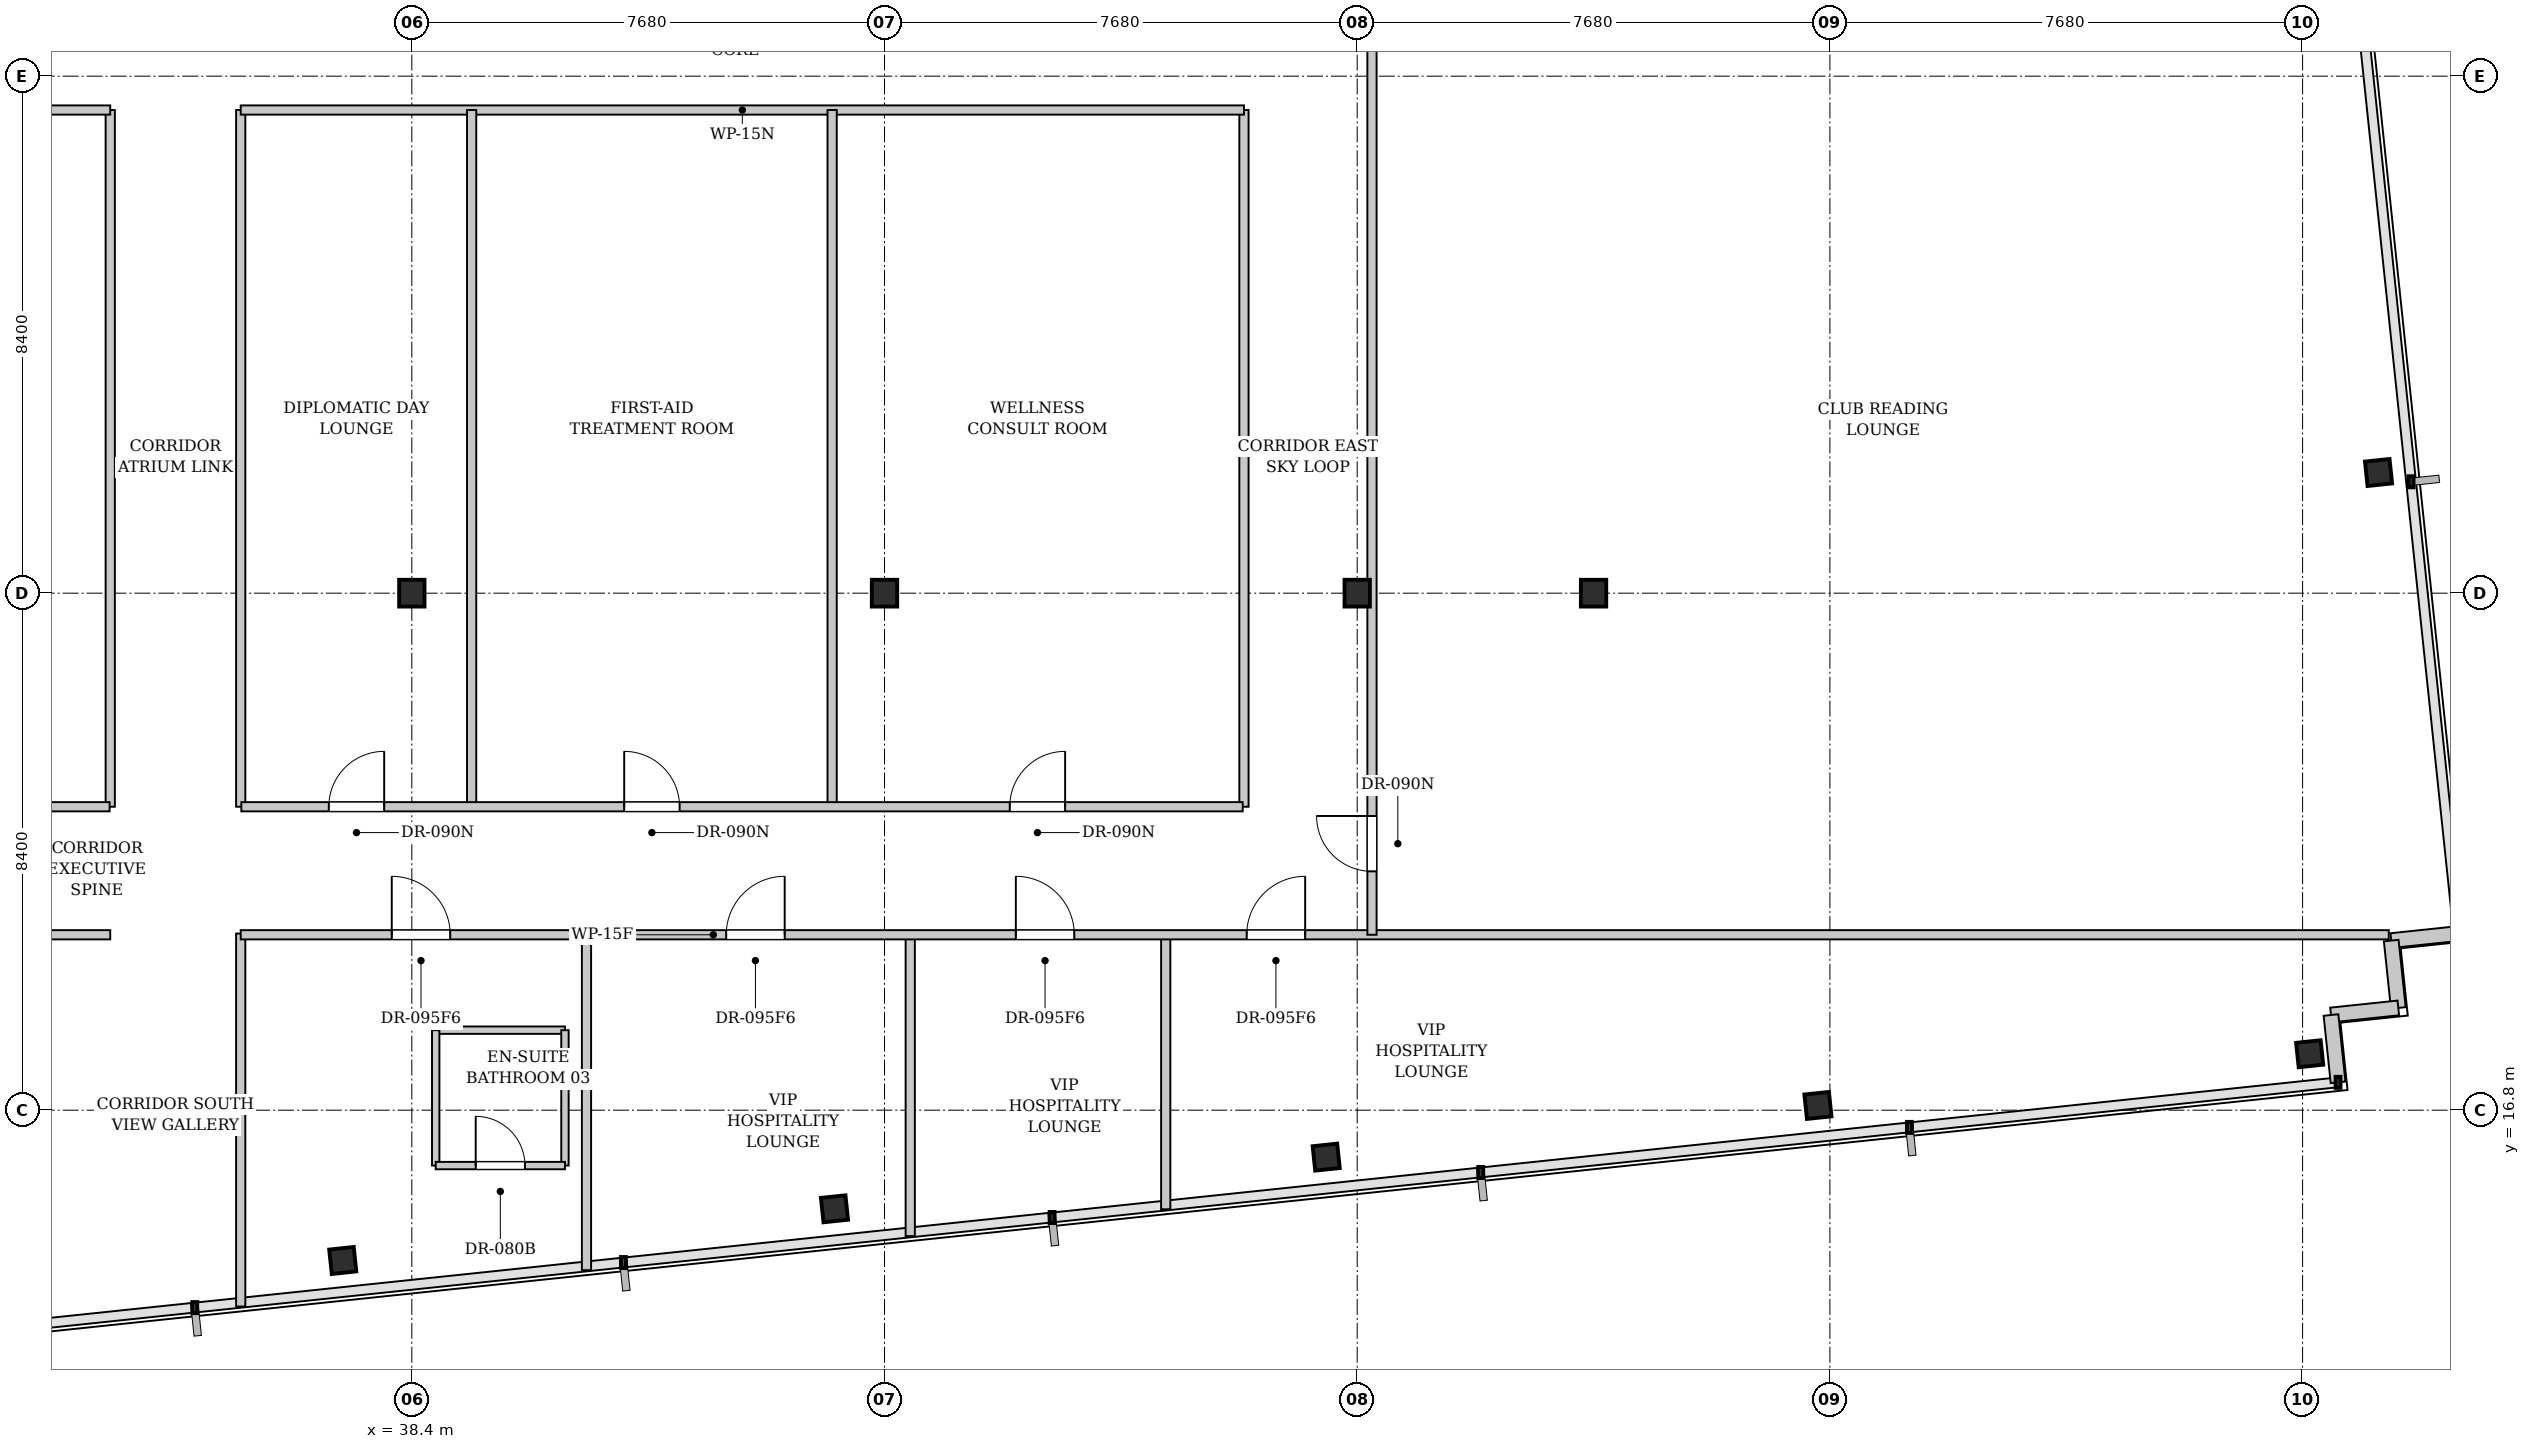
"""IFC4 building model, lengths in metres.
Left out: names, types, materials, properties, quantities, classifications, styles, units other than length and angle.
Written with IfcOpenShell. Run it as: python <this file> out.ifc"""

import sys

from ifc_helpers import new_model, si_unit, direction, frame, frame_2d, origin, origin_2d, place, context, subcontext, project, spatial, rectangle, i_section, extrude, element, fill, save


model = new_model("IFC4")
c1 = context("Model", 3, precision=1e-05, world=origin(), true_north=direction((0.0, 1.0)))
c2 = subcontext(c1, "Body", "Model", "MODEL_VIEW")
j1 = project(units=[si_unit("LENGTHUNIT", "METRE"), si_unit("PLANEANGLEUNIT", "RADIAN")], contexts=[c1])
p1 = place(None, origin())
s1 = spatial("IfcSite", under=j1, at=p1, CompositionType="ELEMENT")
p2 = place(p1, origin())
s2 = spatial("IfcBuilding", under=s1, at=p2, CompositionType="ELEMENT")
p3 = place(p2, frame((0.0, 0.0, 211.1)))
s3 = spatial("IfcBuildingStorey", under=s2, at=p3, CompositionType="ELEMENT", Elevation=211.1)
for number, where, z_axis, x_axis in (
    (1, (38.4, 25.2, 0.0), (0.0, 0.0, 1.0), (1.0, 0.0, 0.0)),
    (2, (46.08, 25.2, 0.0), (0.0, 0.0, 1.0), (1.0, 0.0, 0.0)),
    (3, (53.76, 25.2, 0.0), (0.0, 0.0, 1.0), (1.0, 0.0, 0.0)),
    (4, (57.6, 25.2, 0.0), (0.0, 0.0, 1.0), (1.0, 0.0, 0.0)),
):
    element("IfcColumn", number, at=place(p3, frame(where, z_axis=z_axis, x_axis=x_axis)), inside=s3, PredefinedType="COLUMN", context=c2, shape_type="SweptSolid", body=[
        extrude(i_section(OverallWidth=0.412, OverallDepth=0.435, WebThickness=0.036, FlangeThickness=0.058, FilletRadius=0.015, at=origin_2d()), origin(), (0.0, 0.0, 1.0), 3.3),
    ])
for number, where, z_axis, x_axis in (
    (5, (37.278, 14.358, 0.0), (0.0, 0.0, 1.0), (0.995, 0.105, 0.0)),
    (6, (45.267, 15.198, 0.0), (0.0, 0.0, 1.0), (0.995, 0.105, 0.0)),
    (7, (53.256, 16.037, 0.0), (0.0, 0.0, 1.0), (0.995, 0.105, 0.0)),
    (8, (61.246, 16.877, 0.0), (0.0, 0.0, 1.0), (0.995, 0.105, 0.0)),
    (9, (69.235, 17.717, 0.0), (0.0, 0.0, 1.0), (0.995, 0.105, 0.0)),
    (10, (70.354, 27.16, 0.0), (0.0, 0.0, 1.0), (0.995, 0.105, 0.0)),
):
    element("IfcColumn", number, at=place(p3, frame(where, z_axis=z_axis, x_axis=x_axis)), inside=s3, PredefinedType="COLUMN", context=c2, shape_type="SweptSolid", body=[
        extrude(i_section(OverallWidth=0.401, OverallDepth=0.399, WebThickness=0.025, FlangeThickness=0.04, FilletRadius=0.015, at=origin_2d()), origin(), (0.0, 0.0, 1.0), 3.3),
    ])
for number, where, z_axis, x_axis in (
    (11, (71.654, 19.67, 0.0), (0.0, 0.0, 1.0), (-0.995, -0.105, 0.0)),
    (12, (70.56, 19.555, 0.0), (0.0, 0.0, 1.0), (0.105, -0.995, 0.0)),
    (13, (70.675, 18.461, 0.0), (0.0, 0.0, 1.0), (-0.995, -0.105, 0.0)),
    (14, (69.581, 18.346, 0.0), (0.0, 0.0, 1.0), (0.105, -0.995, 0.0)),
):
    element("IfcWall", number, at=place(p3, frame(where, z_axis=z_axis, x_axis=x_axis)), inside=s3, PredefinedType="SOLIDWALL", context=c2, shape_type="SweptSolid", body=[
        extrude(rectangle(XDim=1.1, YDim=0.24, at=frame_2d((0.55, 0.0))), origin(), (0.0, 0.0, 1.0), 3.08),
    ])
p4 = place(p3, frame((38.788, 18.1, 0.0), z_axis=(0.0, 0.0, 1.0), x_axis=(1.0, 0.0, 0.0)))
e15 = element("IfcWall", 15, at=p4, inside=s3, PredefinedType="PARTITIONING", context=c2, shape_type="SweptSolid", body=[
    extrude(rectangle(XDim=2.1, YDim=0.12, at=frame_2d((1.05, 0.0))), origin(), (0.0, 0.0, 1.0), 3.08),
])
for number, where, z_axis, x_axis in (
    (16, (38.788, 15.9, 0.0), (0.0, 0.0, 1.0), (0.0, 1.0, 0.0)),
    (17, (40.888, 15.9, 0.0), (0.0, 0.0, 1.0), (0.0, 1.0, 0.0)),
):
    element("IfcWall", number, at=place(p3, frame(where, z_axis=z_axis, x_axis=x_axis)), inside=s3, PredefinedType="PARTITIONING", context=c2, shape_type="SweptSolid", body=[
        extrude(rectangle(XDim=2.2, YDim=0.12, at=frame_2d((1.1, 0.0))), origin(), (0.0, 0.0, 1.0), 3.08),
    ])
p5 = place(p3, frame((38.788, 15.9, 0.0), z_axis=(0.0, 0.0, 1.0), x_axis=(1.0, 0.0, 0.0)))
e18 = element("IfcWall", 18, at=p5, inside=s3, PredefinedType="PARTITIONING", context=c2, shape_type="SweptSolid", body=[
    extrude(rectangle(XDim=2.1, YDim=0.12, at=frame_2d((1.05, 0.0))), origin(), (0.0, 0.0, 1.0), 3.08),
])
p6 = place(p5, frame((0.65, 0.0, 0.0)))
e19 = element("IfcOpeningElement", 19, at=p6, cuts=e18, PredefinedType="OPENING", context=c2, shape_type="SweptSolid", body=[
    extrude(rectangle(XDim=0.8, YDim=2.1, at=frame_2d((0.4, 1.05))), frame((0.0, 0.07, 0.0), z_axis=(0.0, -1.0, 0.0), x_axis=(1.0, 0.0, 0.0)), (0.0, 0.0, 1.0), 0.14),
])
p7 = place(p3, frame((35.62, 13.611, 0.0), z_axis=(0.0, 0.0, 1.0), x_axis=(0.0, 1.0, 0.0)))
e20 = element("IfcWall", 20, at=p7, inside=s3, PredefinedType="PARTITIONING", context=c2, shape_type="SweptSolid", body=[
    extrude(rectangle(XDim=6.059, YDim=0.15, at=frame_2d((3.03, 0.0))), origin(), (0.0, 0.0, 1.0), 3.08),
])
p8 = place(p3, frame((41.238, 14.201, 0.0), z_axis=(0.0, 0.0, 1.0), x_axis=(0.0, 1.0, 0.0)))
e21 = element("IfcWall", 21, at=p8, inside=s3, PredefinedType="PARTITIONING", context=c2, shape_type="SweptSolid", body=[
    extrude(rectangle(XDim=5.469, YDim=0.15, at=frame_2d((2.734, 0.0))), origin(), (0.0, 0.0, 1.0), 3.08),
])
p9 = place(p3, frame((46.498, 14.754, 0.0), z_axis=(0.0, 0.0, 1.0), x_axis=(0.0, 1.0, 0.0)))
e22 = element("IfcWall", 22, at=p9, inside=s3, PredefinedType="PARTITIONING", context=c2, shape_type="SweptSolid", body=[
    extrude(rectangle(XDim=4.916, YDim=0.15, at=frame_2d((2.458, 0.0))), origin(), (0.0, 0.0, 1.0), 3.08),
])
p10 = place(p3, frame((50.649, 15.19, 0.0), z_axis=(0.0, 0.0, 1.0), x_axis=(0.0, 1.0, 0.0)))
e23 = element("IfcWall", 23, at=p10, inside=s3, PredefinedType="PARTITIONING", context=c2, shape_type="SweptSolid", body=[
    extrude(rectangle(XDim=4.48, YDim=0.15, at=frame_2d((2.24, 0.0))), origin(), (0.0, 0.0, 1.0), 3.08),
])
p11 = place(p3, frame((17.882, 19.65, 0.0), z_axis=(0.0, 0.0, 1.0), x_axis=(1.0, 0.0, 0.0)))
e24 = element("IfcWall", 24, at=p11, inside=s3, PredefinedType="PARTITIONING", context=c2, shape_type="SweptSolid", body=[
    extrude(rectangle(XDim=15.618, YDim=0.15, at=frame_2d((7.809, 0.0))), origin(), (0.0, 0.0, 1.0), 2.715),
])
p12 = place(p11, frame((10.403, 0.0, 0.0)))
e25 = element("IfcOpeningElement", 25, at=p12, cuts=e24, PredefinedType="OPENING", context=c2, shape_type="SweptSolid", body=[
    extrude(rectangle(XDim=0.95, YDim=2.15, at=frame_2d((0.475, 1.075))), frame((0.0, 0.085, 0.0), z_axis=(0.0, -1.0, 0.0), x_axis=(1.0, 0.0, 0.0)), (0.0, 0.0, 1.0), 0.17),
])
p13 = place(p3, frame((35.62, 19.65, 0.0), z_axis=(0.0, 0.0, 1.0), x_axis=(1.0, 0.0, 0.0)))
e26 = element("IfcWall", 26, at=p13, inside=s3, PredefinedType="PARTITIONING", context=c2, shape_type="SweptSolid", body=[
    extrude(rectangle(XDim=34.9, YDim=0.15, at=frame_2d((17.45, 0.0))), origin(), (0.0, 0.0, 1.0), 2.715),
])
p14 = place(p13, frame((2.454, 0.0, 0.0)))
e27 = element("IfcOpeningElement", 27, at=p14, cuts=e26, PredefinedType="OPENING", context=c2, shape_type="SweptSolid", body=[
    extrude(rectangle(XDim=0.95, YDim=2.15, at=frame_2d((0.475, 1.075))), frame((0.0, 0.085, 0.0), z_axis=(0.0, -1.0, 0.0), x_axis=(1.0, 0.0, 0.0)), (0.0, 0.0, 1.0), 0.17),
])
p15 = place(p13, frame((7.888, 0.0, 0.0)))
e28 = element("IfcOpeningElement", 28, at=p15, cuts=e26, PredefinedType="OPENING", context=c2, shape_type="SweptSolid", body=[
    extrude(rectangle(XDim=0.95, YDim=2.15, at=frame_2d((0.475, 1.075))), frame((0.0, 0.085, 0.0), z_axis=(0.0, -1.0, 0.0), x_axis=(1.0, 0.0, 0.0)), (0.0, 0.0, 1.0), 0.17),
])
p16 = place(p13, frame((12.594, 0.0, 0.0)))
e29 = element("IfcOpeningElement", 29, at=p16, cuts=e26, PredefinedType="OPENING", context=c2, shape_type="SweptSolid", body=[
    extrude(rectangle(XDim=0.95, YDim=2.15, at=frame_2d((0.475, 1.075))), frame((0.0, 0.085, 0.0), z_axis=(0.0, -1.0, 0.0), x_axis=(1.0, 0.0, 0.0)), (0.0, 0.0, 1.0), 0.17),
])
p17 = place(p13, frame((16.344, 0.0, 0.0)))
e30 = element("IfcOpeningElement", 30, at=p17, cuts=e26, PredefinedType="OPENING", context=c2, shape_type="SweptSolid", body=[
    extrude(rectangle(XDim=0.95, YDim=2.15, at=frame_2d((0.475, 1.075))), frame((0.0, 0.085, 0.0), z_axis=(0.0, -1.0, 0.0), x_axis=(1.0, 0.0, 0.0)), (0.0, 0.0, 1.0), 0.17),
])
p18 = place(p3, frame((54.0, 19.65, 0.0), z_axis=(0.0, 0.0, 1.0), x_axis=(0.0, 1.0, 0.0)))
e31 = element("IfcWall", 31, at=p18, inside=s3, PredefinedType="PARTITIONING", context=c2, shape_type="SweptSolid", body=[
    extrude(rectangle(XDim=15.49, YDim=0.15, at=frame_2d((7.745, 0.0))), origin(), (0.0, 0.0, 1.0), 3.08),
])
p19 = place(p18, frame((1.03, 0.0, 0.0)))
e32 = element("IfcOpeningElement", 32, at=p19, cuts=e31, PredefinedType="OPENING", context=c2, shape_type="SweptSolid", body=[
    extrude(rectangle(XDim=0.9, YDim=2.15, at=frame_2d((0.45, 1.075))), frame((0.0, 0.085, 0.0), z_axis=(0.0, -1.0, 0.0), x_axis=(1.0, 0.0, 0.0)), (0.0, 0.0, 1.0), 0.17),
])
for number, where, z_axis, x_axis in (
    (33, (51.92, 21.73, 0.0), (0.0, 0.0, 1.0), (0.0, 1.0, 0.0)),
    (34, (33.5, 21.73, 0.0), (0.0, 0.0, 1.0), (0.0, 1.0, 0.0)),
    (35, (35.62, 21.73, 0.0), (0.0, 0.0, 1.0), (0.0, 1.0, 0.0)),
):
    element("IfcWall", number, at=place(p3, frame(where, z_axis=z_axis, x_axis=x_axis)), inside=s3, PredefinedType="PARTITIONING", context=c2, shape_type="SweptSolid", body=[
        extrude(rectangle(XDim=11.32, YDim=0.15, at=frame_2d((5.66, 0.0))), origin(), (0.0, 0.0, 1.0), 3.08),
    ])
p20 = place(p3, frame((25.88, 33.05, 0.0), z_axis=(0.0, 0.0, 1.0), x_axis=(1.0, 0.0, 0.0)))
e36 = element("IfcWall", 36, at=p20, inside=s3, PredefinedType="PARTITIONING", context=c2, shape_type="SweptSolid", body=[
    extrude(rectangle(XDim=7.62, YDim=0.15, at=frame_2d((3.81, 0.0))), origin(), (0.0, 0.0, 1.0), 3.08),
])
p21 = place(p3, frame((35.62, 33.05, 0.0), z_axis=(0.0, 0.0, 1.0), x_axis=(1.0, 0.0, 0.0)))
e37 = element("IfcWall", 37, at=p21, inside=s3, PredefinedType="PARTITIONING", context=c2, shape_type="SweptSolid", body=[
    extrude(rectangle(XDim=16.3, YDim=0.15, at=frame_2d((8.15, 0.0))), origin(), (0.0, 0.0, 1.0), 3.08),
])
p22 = place(p3, frame((25.9, 21.73, 0.0), z_axis=(0.0, 0.0, 1.0), x_axis=(1.0, 0.0, 0.0)))
e38 = element("IfcWall", 38, at=p22, inside=s3, PredefinedType="PARTITIONING", context=c2, shape_type="SweptSolid", body=[
    extrude(rectangle(XDim=7.59, YDim=0.15, at=frame_2d((3.795, 0.0))), origin(), (0.0, 0.0, 1.0), 3.08),
])
p23 = place(p22, frame((3.345, 0.0, 0.0)))
e39 = element("IfcOpeningElement", 39, at=p23, cuts=e38, PredefinedType="OPENING", context=c2, shape_type="SweptSolid", body=[
    extrude(rectangle(XDim=0.9, YDim=2.15, at=frame_2d((0.45, 1.075))), frame((0.0, 0.085, 0.0), z_axis=(0.0, -1.0, 0.0), x_axis=(1.0, 0.0, 0.0)), (0.0, 0.0, 1.0), 0.17),
])
for number, where, z_axis, x_axis in (
    (40, (39.372, 21.73, 0.0), (0.0, 0.0, 1.0), (0.0, 1.0, 0.0)),
    (41, (45.229, 21.73, 0.0), (0.0, 0.0, 1.0), (0.0, 1.0, 0.0)),
):
    element("IfcWall", number, at=place(p3, frame(where, z_axis=z_axis, x_axis=x_axis)), inside=s3, PredefinedType="PARTITIONING", context=c2, shape_type="SweptSolid", body=[
        extrude(rectangle(XDim=11.32, YDim=0.15, at=frame_2d((5.66, 0.0))), origin(), (0.0, 0.0, 1.0), 3.08),
    ])
p24 = place(p3, frame((35.63, 21.73, 0.0), z_axis=(0.0, 0.0, 1.0), x_axis=(1.0, 0.0, 0.0)))
e42 = element("IfcWall", 42, at=p24, inside=s3, PredefinedType="PARTITIONING", context=c2, shape_type="SweptSolid", body=[
    extrude(rectangle(XDim=16.27, YDim=0.15, at=frame_2d((8.135, 0.0))), origin(), (0.0, 0.0, 1.0), 3.08),
])
p25 = place(p24, frame((1.421, 0.0, 0.0)))
e43 = element("IfcOpeningElement", 43, at=p25, cuts=e42, PredefinedType="OPENING", context=c2, shape_type="SweptSolid", body=[
    extrude(rectangle(XDim=0.9, YDim=2.15, at=frame_2d((0.45, 1.075))), frame((0.0, 0.085, 0.0), z_axis=(0.0, -1.0, 0.0), x_axis=(1.0, 0.0, 0.0)), (0.0, 0.0, 1.0), 0.17),
])
p26 = place(p24, frame((6.22, 0.0, 0.0)))
e44 = element("IfcOpeningElement", 44, at=p26, cuts=e42, PredefinedType="OPENING", context=c2, shape_type="SweptSolid", body=[
    extrude(rectangle(XDim=0.9, YDim=2.15, at=frame_2d((0.45, 1.075))), frame((0.0, 0.085, 0.0), z_axis=(0.0, -1.0, 0.0), x_axis=(1.0, 0.0, 0.0)), (0.0, 0.0, 1.0), 0.17),
])
p27 = place(p24, frame((12.485, 0.0, 0.0)))
e45 = element("IfcOpeningElement", 45, at=p27, cuts=e42, PredefinedType="OPENING", context=c2, shape_type="SweptSolid", body=[
    extrude(rectangle(XDim=0.9, YDim=2.15, at=frame_2d((0.45, 1.075))), frame((0.0, 0.085, 0.0), z_axis=(0.0, -1.0, 0.0), x_axis=(1.0, 0.0, 0.0)), (0.0, 0.0, 1.0), 0.17),
])
p28 = place(p6, origin())
e46 = element("IfcDoor", 46, at=p28, inside=s3, OperationType="SINGLE_SWING_LEFT", PredefinedType="DOOR", context=c2, shape_type="SweptSolid", body=[
    extrude(rectangle(XDim=0.8, YDim=2.1, at=frame_2d((0.4, 1.05))), frame((0.0, 0.025, 0.0), z_axis=(0.0, -1.0, 0.0), x_axis=(1.0, 0.0, 0.0)), (0.0, 0.0, 1.0), 0.05),
])
fill(e19, e46)
p29 = place(p14, origin())
e47 = element("IfcDoor", 47, at=p29, inside=s3, OperationType="SINGLE_SWING_LEFT", PredefinedType="DOOR", context=c2, shape_type="SweptSolid", body=[
    extrude(rectangle(XDim=0.95, YDim=2.15, at=frame_2d((0.475, 1.075))), frame((0.0, 0.025, 0.0), z_axis=(0.0, -1.0, 0.0), x_axis=(1.0, 0.0, 0.0)), (0.0, 0.0, 1.0), 0.05),
])
fill(e27, e47)
p30 = place(p15, origin())
e48 = element("IfcDoor", 48, at=p30, inside=s3, OperationType="SINGLE_SWING_RIGHT", PredefinedType="DOOR", context=c2, shape_type="SweptSolid", body=[
    extrude(rectangle(XDim=0.95, YDim=2.15, at=frame_2d((0.475, 1.075))), frame((0.0, 0.025, 0.0), z_axis=(0.0, -1.0, 0.0), x_axis=(1.0, 0.0, 0.0)), (0.0, 0.0, 1.0), 0.05),
])
fill(e28, e48)
p31 = place(p16, origin())
e49 = element("IfcDoor", 49, at=p31, inside=s3, OperationType="SINGLE_SWING_LEFT", PredefinedType="DOOR", context=c2, shape_type="SweptSolid", body=[
    extrude(rectangle(XDim=0.95, YDim=2.15, at=frame_2d((0.475, 1.075))), frame((0.0, 0.025, 0.0), z_axis=(0.0, -1.0, 0.0), x_axis=(1.0, 0.0, 0.0)), (0.0, 0.0, 1.0), 0.05),
])
fill(e29, e49)
p32 = place(p17, origin())
e50 = element("IfcDoor", 50, at=p32, inside=s3, OperationType="SINGLE_SWING_RIGHT", PredefinedType="DOOR", context=c2, shape_type="SweptSolid", body=[
    extrude(rectangle(XDim=0.95, YDim=2.15, at=frame_2d((0.475, 1.075))), frame((0.0, 0.025, 0.0), z_axis=(0.0, -1.0, 0.0), x_axis=(1.0, 0.0, 0.0)), (0.0, 0.0, 1.0), 0.05),
])
fill(e30, e50)
p33 = place(p19, origin())
e51 = element("IfcDoor", 51, at=p33, inside=s3, OperationType="SINGLE_SWING_RIGHT", PredefinedType="DOOR", context=c2, shape_type="SweptSolid", body=[
    extrude(rectangle(XDim=0.9, YDim=2.15, at=frame_2d((0.45, 1.075))), frame((0.0, 0.025, 0.0), z_axis=(0.0, -1.0, 0.0), x_axis=(1.0, 0.0, 0.0)), (0.0, 0.0, 1.0), 0.05),
])
fill(e32, e51)
p34 = place(p25, origin())
e52 = element("IfcDoor", 52, at=p34, inside=s3, OperationType="SINGLE_SWING_RIGHT", PredefinedType="DOOR", context=c2, shape_type="SweptSolid", body=[
    extrude(rectangle(XDim=0.9, YDim=2.15, at=frame_2d((0.45, 1.075))), frame((0.0, 0.025, 0.0), z_axis=(0.0, -1.0, 0.0), x_axis=(1.0, 0.0, 0.0)), (0.0, 0.0, 1.0), 0.05),
])
fill(e43, e52)
p35 = place(p26, origin())
e53 = element("IfcDoor", 53, at=p35, inside=s3, OperationType="SINGLE_SWING_LEFT", PredefinedType="DOOR", context=c2, shape_type="SweptSolid", body=[
    extrude(rectangle(XDim=0.9, YDim=2.15, at=frame_2d((0.45, 1.075))), frame((0.0, 0.025, 0.0), z_axis=(0.0, -1.0, 0.0), x_axis=(1.0, 0.0, 0.0)), (0.0, 0.0, 1.0), 0.05),
])
fill(e44, e53)
p36 = place(p27, origin())
e54 = element("IfcDoor", 54, at=p36, inside=s3, OperationType="SINGLE_SWING_RIGHT", PredefinedType="DOOR", context=c2, shape_type="SweptSolid", body=[
    extrude(rectangle(XDim=0.9, YDim=2.15, at=frame_2d((0.45, 1.075))), frame((0.0, 0.025, 0.0), z_axis=(0.0, -1.0, 0.0), x_axis=(1.0, 0.0, 0.0)), (0.0, 0.0, 1.0), 0.05),
])
fill(e45, e54)
save(model, sys.argv[1])
